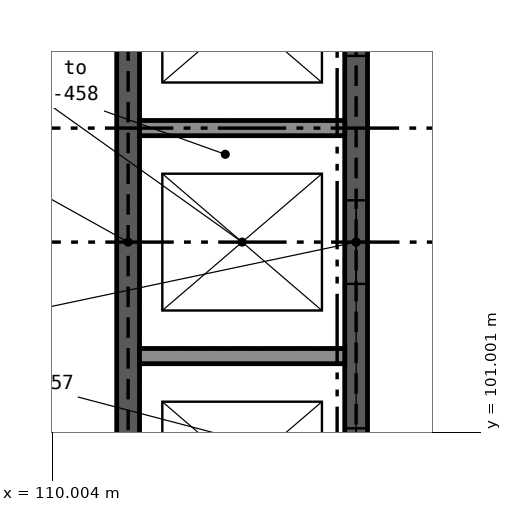
"""IFC4 building model, lengths in metres.
Left out: names, types, materials, properties, quantities, classifications, styles, units other than length and angle.
Written with IfcOpenShell. Run it as: python <this file> out.ifc"""

import sys

from ifc_helpers import new_model, si_unit, direction, frame, frame_2d, origin, place, context, subcontext, project, spatial, rectangle, extrude, element, fill, save


model = new_model("IFC4")
c1 = context("Model", 3, precision=1e-05, world=origin(), true_north=direction((0.0, 1.0)))
c2 = subcontext(c1, "Body", "Model", "MODEL_VIEW")
j1 = project(units=[si_unit("LENGTHUNIT", "METRE"), si_unit("PLANEANGLEUNIT", "RADIAN")], contexts=[c1])
p1 = place(None, origin())
s1 = spatial("IfcSite", under=j1, at=p1, CompositionType="ELEMENT")
p2 = place(p1, origin())
s2 = spatial("IfcBuilding", under=s1, at=p2, CompositionType="ELEMENT")
p3 = place(p2, origin())
s3 = spatial("IfcBuildingStorey", under=s2, at=p3, CompositionType="ELEMENT", Elevation=0.0)
p4 = place(p3, frame((111.0, 99.15, -1.9), z_axis=(0.0, 0.0, 1.0), x_axis=(0.0, 1.0, 0.0)))
e1 = element("IfcWall", 1, at=p4, inside=s3, PredefinedType="SHEAR", context=c2, shape_type="SweptSolid", body=[
    extrude(rectangle(XDim=8.7, YDim=0.3, at=frame_2d((4.35, 0.0))), origin(), (0.0, 0.0, 1.0), 7.3),
])
p5 = place(p3, frame((114.0, 99.15, -1.9), z_axis=(0.0, 0.0, 1.0), x_axis=(0.0, 1.0, 0.0)))
e2 = element("IfcWall", 2, at=p5, inside=s3, PredefinedType="SHEAR", context=c2, shape_type="SweptSolid", body=[
    extrude(rectangle(XDim=8.7, YDim=0.3, at=frame_2d((4.35, 0.0))), origin(), (0.0, 0.0, 1.0), 7.3),
])
p6 = place(p5, frame((0.8, 0.0, 1.9)))
e3 = element("IfcOpeningElement", 3, at=p6, cuts=e2, PredefinedType="OPENING", context=c2, shape_type="SweptSolid", body=[
    extrude(rectangle(XDim=1.1, YDim=2.1, at=frame_2d((0.55, 1.05))), frame((0.0, 0.161, 0.0), z_axis=(0.0, -1.0, 0.0), x_axis=(1.0, 0.0, 0.0)), (0.0, 0.0, 1.0), 0.322),
])
p7 = place(p5, frame((3.8, 0.0, 1.9)))
e4 = element("IfcOpeningElement", 4, at=p7, cuts=e2, PredefinedType="OPENING", context=c2, shape_type="SweptSolid", body=[
    extrude(rectangle(XDim=1.1, YDim=2.1, at=frame_2d((0.55, 1.05))), frame((0.0, 0.161, 0.0), z_axis=(0.0, -1.0, 0.0), x_axis=(1.0, 0.0, 0.0)), (0.0, 0.0, 1.0), 0.322),
])
p8 = place(p5, frame((6.8, 0.0, 1.9)))
e5 = element("IfcOpeningElement", 5, at=p8, cuts=e2, PredefinedType="OPENING", context=c2, shape_type="SweptSolid", body=[
    extrude(rectangle(XDim=1.1, YDim=2.1, at=frame_2d((0.55, 1.05))), frame((0.0, 0.161, 0.0), z_axis=(0.0, -1.0, 0.0), x_axis=(1.0, 0.0, 0.0)), (0.0, 0.0, 1.0), 0.322),
])
for number, where, z_axis, x_axis in (
    (6, (111.15, 102.0, -1.9), (0.0, 0.0, 1.0), (1.0, 0.0, 0.0)),
    (7, (111.15, 105.0, -1.9), (0.0, 0.0, 1.0), (1.0, 0.0, 0.0)),
):
    element("IfcWall", number, at=place(p3, frame(where, z_axis=z_axis, x_axis=x_axis)), inside=s3, PredefinedType="SOLIDWALL", context=c2, shape_type="SweptSolid", body=[
        extrude(rectangle(XDim=2.7, YDim=0.2, at=frame_2d((1.35, 0.0))), origin(), (0.0, 0.0, 1.0), 7.3),
    ])
p9 = place(p6, origin())
e8 = element("IfcDoor", 8, at=p9, inside=s3, OperationType="DOUBLE_DOOR_SLIDING", PredefinedType="DOOR", context=c2, shape_type="SweptSolid", body=[
    extrude(rectangle(XDim=1.1, YDim=2.1, at=frame_2d((0.55, 1.05))), frame((0.0, 0.025, 0.0), z_axis=(0.0, -1.0, 0.0), x_axis=(1.0, 0.0, 0.0)), (0.0, 0.0, 1.0), 0.05),
])
fill(e3, e8)
p10 = place(p7, origin())
e9 = element("IfcDoor", 9, at=p10, inside=s3, OperationType="DOUBLE_DOOR_SLIDING", PredefinedType="DOOR", context=c2, shape_type="SweptSolid", body=[
    extrude(rectangle(XDim=1.1, YDim=2.1, at=frame_2d((0.55, 1.05))), frame((0.0, 0.025, 0.0), z_axis=(0.0, -1.0, 0.0), x_axis=(1.0, 0.0, 0.0)), (0.0, 0.0, 1.0), 0.05),
])
fill(e4, e9)
p11 = place(p8, origin())
e10 = element("IfcDoor", 10, at=p11, inside=s3, OperationType="DOUBLE_DOOR_SLIDING", PredefinedType="DOOR", context=c2, shape_type="SweptSolid", body=[
    extrude(rectangle(XDim=1.1, YDim=2.1, at=frame_2d((0.55, 1.05))), frame((0.0, 0.025, 0.0), z_axis=(0.0, -1.0, 0.0), x_axis=(1.0, 0.0, 0.0)), (0.0, 0.0, 1.0), 0.05),
])
fill(e5, e10)
save(model, sys.argv[1])
